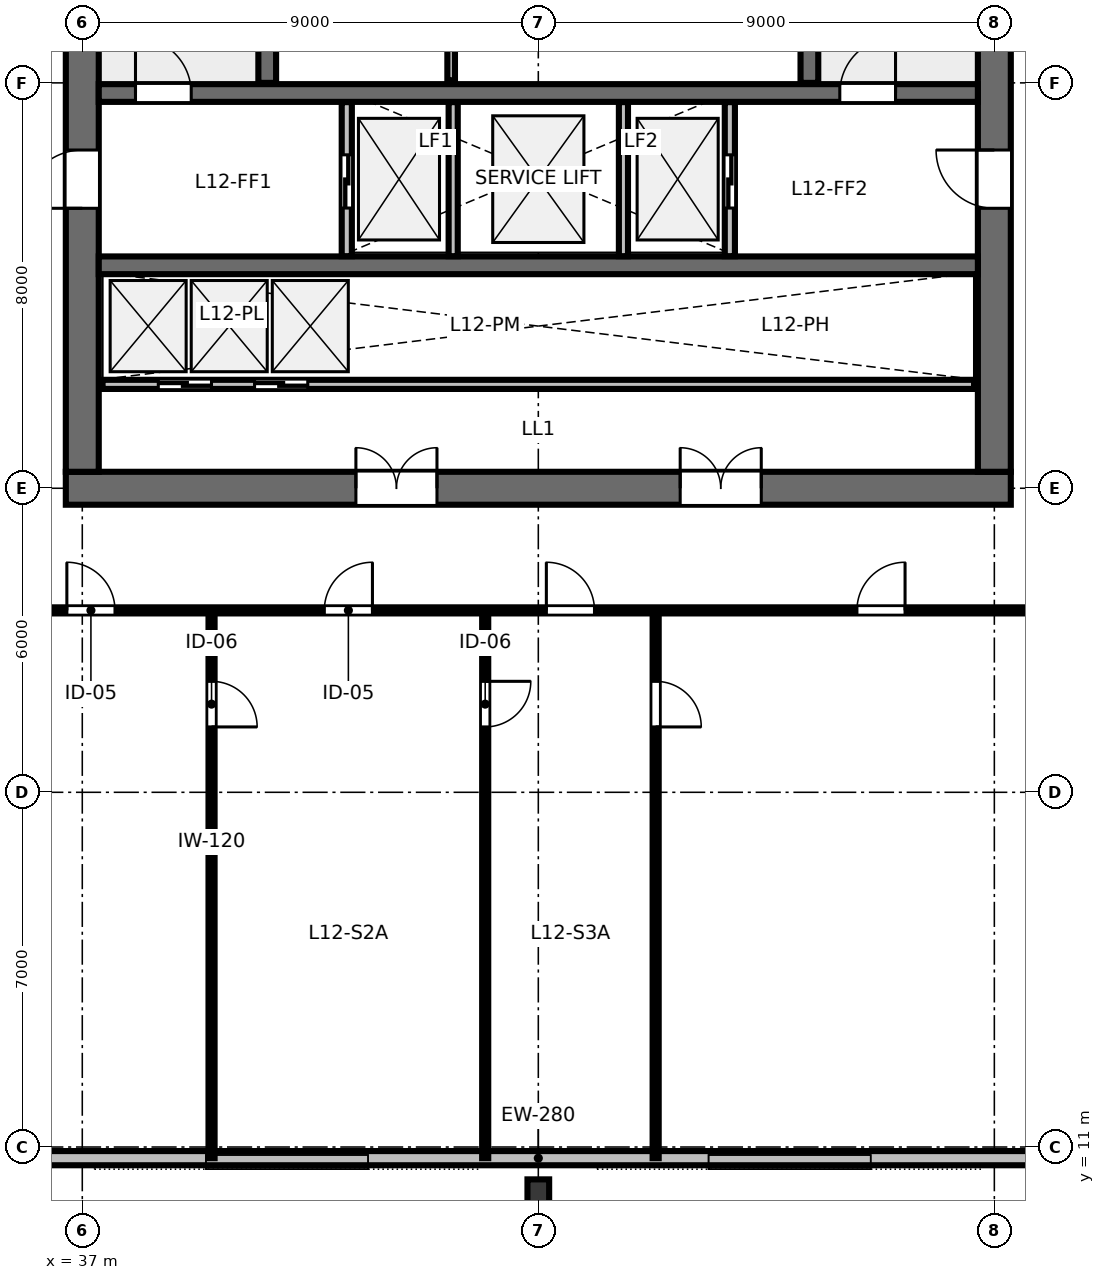
"""IFC4 building model, lengths in metres.
Left out: names, types, materials, properties, quantities, classifications, styles, units other than length and angle.
Written with IfcOpenShell. Run it as: python <this file> out.ifc"""

import sys

from ifc_helpers import new_model, si_unit, direction, frame, frame_2d, origin, origin_2d, place, context, subcontext, project, spatial, rectangle, i_section, extrude, element, fill, save


model = new_model("IFC4")
c1 = context("Model", 3, precision=1e-05, world=origin(), true_north=direction((0.0, 1.0)))
c2 = subcontext(c1, "Body", "Model", "MODEL_VIEW")
j1 = project(units=[si_unit("LENGTHUNIT", "METRE"), si_unit("PLANEANGLEUNIT", "RADIAN")], contexts=[c1])
p1 = place(None, origin())
s1 = spatial("IfcSite", under=j1, at=p1, CompositionType="ELEMENT")
p2 = place(p1, origin())
s2 = spatial("IfcBuilding", under=s1, at=p2, CompositionType="ELEMENT")
p3 = place(p2, frame((0.0, 0.0, 49.6)))
s3 = spatial("IfcBuildingStorey", under=s2, at=p3, CompositionType="ELEMENT", Elevation=49.6)
p4 = place(p3, frame((36.675, 24.0, 0.0), z_axis=(0.0, 0.0, 1.0), x_axis=(1.0, 0.0, 0.0)))
e1 = element("IfcWall", 1, at=p4, inside=s3, PredefinedType="SHEAR", context=c2, shape_type="SweptSolid", body=[
    extrude(rectangle(XDim=18.65, YDim=0.65, at=frame_2d((9.325, 0.0))), origin(), (0.0, 0.0, 1.0), 3.36),
])
p5 = place(p4, frame((5.725, 0.0, 0.0)))
e2 = element("IfcOpeningElement", 2, at=p5, cuts=e1, PredefinedType="OPENING", context=c2, shape_type="SweptSolid", body=[
    extrude(rectangle(XDim=1.6, YDim=2.15, at=frame_2d((0.8, 1.075))), frame((0.0, 0.335, 0.0), z_axis=(0.0, -1.0, 0.0), x_axis=(1.0, 0.0, 0.0)), (0.0, 0.0, 1.0), 0.67),
])
p6 = place(p4, frame((12.125, 0.0, 0.0)))
e3 = element("IfcOpeningElement", 3, at=p6, cuts=e1, PredefinedType="OPENING", context=c2, shape_type="SweptSolid", body=[
    extrude(rectangle(XDim=1.6, YDim=2.15, at=frame_2d((0.8, 1.075))), frame((0.0, 0.335, 0.0), z_axis=(0.0, -1.0, 0.0), x_axis=(1.0, 0.0, 0.0)), (0.0, 0.0, 1.0), 0.67),
])
p7 = place(p3, frame((37.0, 24.325, 0.0), z_axis=(0.0, 0.0, 1.0), x_axis=(0.0, 1.0, 0.0)))
e4 = element("IfcWall", 4, at=p7, inside=s3, PredefinedType="SHEAR", context=c2, shape_type="SweptSolid", body=[
    extrude(rectangle(XDim=15.35, YDim=0.65, at=frame_2d((7.675, 0.0))), origin(), (0.0, 0.0, 1.0), 3.36),
])
p8 = place(p7, frame((5.2, 0.0, 0.0)))
e5 = element("IfcOpeningElement", 5, at=p8, cuts=e4, PredefinedType="OPENING", context=c2, shape_type="SweptSolid", body=[
    extrude(rectangle(XDim=1.15, YDim=2.15, at=frame_2d((0.575, 1.075))), frame((0.0, 0.335, 0.0), z_axis=(0.0, -1.0, 0.0), x_axis=(1.0, 0.0, 0.0)), (0.0, 0.0, 1.0), 0.67),
])
p9 = place(p3, frame((55.0, 24.325, 0.0), z_axis=(0.0, 0.0, 1.0), x_axis=(0.0, 1.0, 0.0)))
e6 = element("IfcWall", 6, at=p9, inside=s3, PredefinedType="SHEAR", context=c2, shape_type="SweptSolid", body=[
    extrude(rectangle(XDim=15.35, YDim=0.65, at=frame_2d((7.675, 0.0))), origin(), (0.0, 0.0, 1.0), 3.36),
])
p10 = place(p9, frame((5.2, 0.0, 0.0)))
e7 = element("IfcOpeningElement", 7, at=p10, cuts=e6, PredefinedType="OPENING", context=c2, shape_type="SweptSolid", body=[
    extrude(rectangle(XDim=1.15, YDim=2.15, at=frame_2d((0.575, 1.075))), frame((0.0, 0.335, 0.0), z_axis=(0.0, -1.0, 0.0), x_axis=(1.0, 0.0, 0.0)), (0.0, 0.0, 1.0), 0.67),
])
p11 = place(p3, frame((37.325, 31.8, 0.0), z_axis=(0.0, 0.0, 1.0), x_axis=(1.0, 0.0, 0.0)))
e8 = element("IfcWall", 8, at=p11, inside=s3, PredefinedType="SHEAR", context=c2, shape_type="SweptSolid", body=[
    extrude(rectangle(XDim=17.35, YDim=0.35, at=frame_2d((8.675, 0.0))), origin(), (0.0, 0.0, 1.0), 3.36),
])
p12 = place(p11, frame((0.725, 0.0, 0.0)))
e9 = element("IfcOpeningElement", 9, at=p12, cuts=e8, PredefinedType="OPENING", context=c2, shape_type="SweptSolid", body=[
    extrude(rectangle(XDim=1.1, YDim=2.15, at=frame_2d((0.55, 1.075))), frame((0.0, 0.185, 0.0), z_axis=(0.0, -1.0, 0.0), x_axis=(1.0, 0.0, 0.0)), (0.0, 0.0, 1.0), 0.37),
])
p13 = place(p11, frame((14.625, 0.0, 0.0)))
e10 = element("IfcOpeningElement", 10, at=p13, cuts=e8, PredefinedType="OPENING", context=c2, shape_type="SweptSolid", body=[
    extrude(rectangle(XDim=1.1, YDim=2.15, at=frame_2d((0.55, 1.075))), frame((0.0, 0.185, 0.0), z_axis=(0.0, -1.0, 0.0), x_axis=(1.0, 0.0, 0.0)), (0.0, 0.0, 1.0), 0.37),
])
p14 = place(p3, frame((37.325, 28.4, 0.0), z_axis=(0.0, 0.0, 1.0), x_axis=(1.0, 0.0, 0.0)))
e11 = element("IfcWall", 11, at=p14, inside=s3, PredefinedType="SHEAR", context=c2, shape_type="SweptSolid", body=[
    extrude(rectangle(XDim=17.35, YDim=0.35, at=frame_2d((8.675, 0.0))), origin(), (0.0, 0.0, 1.0), 3.36),
])
p15 = place(p3, frame((46.0, 10.12, 0.0), z_axis=(0.0, 0.0, 1.0), x_axis=(1.0, 0.0, 0.0)))
e12 = element("IfcColumn", 12, at=p15, inside=s3, PredefinedType="COLUMN", context=c2, shape_type="SweptSolid", body=[
    extrude(i_section(OverallWidth=0.428, OverallDepth=0.483, WebThickness=0.051, FlangeThickness=0.082, FilletRadius=0.025, at=origin_2d()), origin(), (0.0, 0.0, 1.0), 3.358),
])
p16 = place(p3, frame((25.26, 10.78, 0.0), z_axis=(0.0, 0.0, 1.0), x_axis=(1.0, 0.0, 0.0)))
e13 = element("IfcWall", 13, at=p16, inside=s3, PredefinedType="STANDARD", context=c2, shape_type="SweptSolid", body=[
    extrude(rectangle(XDim=41.48, YDim=0.28, at=frame_2d((20.74, 0.0))), origin(), (0.0, 0.0, 1.0), 3.36),
])
for number, where, z_axis, x_axis in (
    (14, (40.65, 32.0, 0.0), (0.0, 0.0, 1.0), (0.0, 1.0, 0.0)),
    (15, (51.35, 32.0, 0.0), (0.0, 0.0, 1.0), (0.0, 1.0, 0.0)),
):
    element("IfcWall", number, at=place(p3, frame(where, z_axis=z_axis, x_axis=x_axis)), inside=s3, PredefinedType="SHEAR", context=c2, shape_type="SweptSolid", body=[
        extrude(rectangle(XDim=7.7, YDim=0.35, at=frame_2d((3.85, 0.0))), origin(), (0.0, 0.0, 1.0), 3.6),
    ])
p17 = place(p3, frame((44.28, 32.05, 0.0), z_axis=(0.0, 0.0, 1.0), x_axis=(0.0, 1.0, 0.0)))
e16 = element("IfcWall", 16, at=p17, inside=s3, PredefinedType="PARTITIONING", context=c2, shape_type="SweptSolid", body=[
    extrude(rectangle(XDim=3.67, YDim=0.15, at=frame_2d((1.835, 0.0))), origin(), (0.0, 0.0, 1.0), 3.36),
])
p18 = place(p17, frame((1.35, 0.0, 0.0)))
e17 = element("IfcOpeningElement", 17, at=p18, cuts=e16, PredefinedType="OPENING", context=c2, shape_type="SweptSolid", body=[
    extrude(rectangle(XDim=0.92, YDim=2.15, at=frame_2d((0.46, 1.075))), frame((0.0, 0.085, 0.0), z_axis=(0.0, -1.0, 0.0), x_axis=(1.0, 0.0, 0.0)), (0.0, 0.0, 1.0), 0.17),
])
p19 = place(p3, frame((42.22, 28.58, 0.0), z_axis=(0.0, 0.0, 1.0), x_axis=(0.0, 1.0, 0.0)))
e18 = element("IfcWall", 18, at=p19, inside=s3, PredefinedType="PARTITIONING", context=c2, shape_type="SweptSolid", body=[
    extrude(rectangle(XDim=3.04, YDim=0.2, at=frame_2d((1.52, 0.0))), origin(), (0.0, 0.0, 1.0), 3.36),
])
p20 = place(p19, frame((0.95, 0.0, 0.0)))
e19 = element("IfcOpeningElement", 19, at=p20, cuts=e18, PredefinedType="OPENING", context=c2, shape_type="SweptSolid", body=[
    extrude(rectangle(XDim=1.05, YDim=2.15, at=frame_2d((0.525, 1.075))), frame((0.0, 0.11, 0.0), z_axis=(0.0, -1.0, 0.0), x_axis=(1.0, 0.0, 0.0)), (0.0, 0.0, 1.0), 0.22),
])
p21 = place(p3, frame((49.78, 28.58, 0.0), z_axis=(0.0, 0.0, 1.0), x_axis=(0.0, 1.0, 0.0)))
e20 = element("IfcWall", 20, at=p21, inside=s3, PredefinedType="PARTITIONING", context=c2, shape_type="SweptSolid", body=[
    extrude(rectangle(XDim=3.04, YDim=0.2, at=frame_2d((1.52, 0.0))), origin(), (0.0, 0.0, 1.0), 3.36),
])
p22 = place(p21, frame((0.95, 0.0, 0.0)))
e21 = element("IfcOpeningElement", 21, at=p22, cuts=e20, PredefinedType="OPENING", context=c2, shape_type="SweptSolid", body=[
    extrude(rectangle(XDim=1.05, YDim=2.15, at=frame_2d((0.525, 1.075))), frame((0.0, 0.11, 0.0), z_axis=(0.0, -1.0, 0.0), x_axis=(1.0, 0.0, 0.0)), (0.0, 0.0, 1.0), 0.22),
])
for number, where, z_axis, x_axis in (
    (22, (44.32, 28.58, 0.0), (0.0, 0.0, 1.0), (0.0, 1.0, 0.0)),
    (23, (47.68, 28.58, 0.0), (0.0, 0.0, 1.0), (0.0, 1.0, 0.0)),
):
    element("IfcWall", number, at=place(p3, frame(where, z_axis=z_axis, x_axis=x_axis)), inside=s3, PredefinedType="PARTITIONING", context=c2, shape_type="SweptSolid", body=[
        extrude(rectangle(XDim=3.04, YDim=0.18, at=frame_2d((1.52, 0.0))), origin(), (0.0, 0.0, 1.0), 3.36),
    ])
p23 = place(p3, frame((37.4, 26.05, 0.0), z_axis=(0.0, 0.0, 1.0), x_axis=(1.0, 0.0, 0.0)))
e24 = element("IfcWall", 24, at=p23, inside=s3, PredefinedType="PARTITIONING", context=c2, shape_type="SweptSolid", body=[
    extrude(rectangle(XDim=17.2, YDim=0.18, at=frame_2d((8.6, 0.0))), origin(), (0.0, 0.0, 1.0), 3.36),
])
p24 = place(p23, frame((1.1, 0.0, 0.0)))
e25 = element("IfcOpeningElement", 25, at=p24, cuts=e24, PredefinedType="OPENING", context=c2, shape_type="SweptSolid", body=[
    extrude(rectangle(XDim=1.05, YDim=2.15, at=frame_2d((0.525, 1.075))), frame((0.0, 0.1, 0.0), z_axis=(0.0, -1.0, 0.0), x_axis=(1.0, 0.0, 0.0)), (0.0, 0.0, 1.0), 0.2),
])
p25 = place(p23, frame((3.0, 0.0, 0.0)))
e26 = element("IfcOpeningElement", 26, at=p25, cuts=e24, PredefinedType="OPENING", context=c2, shape_type="SweptSolid", body=[
    extrude(rectangle(XDim=1.05, YDim=2.15, at=frame_2d((0.525, 1.075))), frame((0.0, 0.1, 0.0), z_axis=(0.0, -1.0, 0.0), x_axis=(1.0, 0.0, 0.0)), (0.0, 0.0, 1.0), 0.2),
])
p26 = place(p3, frame((39.551, 21.59, 0.0), z_axis=(0.0, 0.0, 1.0), x_axis=(0.0, -1.0, 0.0)))
e27 = element("IfcWall", 27, at=p26, inside=s3, PredefinedType="PARTITIONING", context=c2, shape_type="SweptSolid", body=[
    extrude(rectangle(XDim=10.81, YDim=0.12, at=frame_2d((5.405, 0.0))), origin(), (0.0, 0.0, 1.0), 2.64),
])
p27 = place(p26, frame((1.4, 0.0, 0.0)))
e28 = element("IfcOpeningElement", 28, at=p27, cuts=e27, PredefinedType="OPENING", context=c2, shape_type="SweptSolid", body=[
    extrude(rectangle(XDim=0.9, YDim=2.15, at=frame_2d((0.45, 1.075))), frame((0.0, 0.07, 0.0), z_axis=(0.0, -1.0, 0.0), x_axis=(1.0, 0.0, 0.0)), (0.0, 0.0, 1.0), 0.14),
])
p28 = place(p3, frame((44.952, 21.59, 0.0), z_axis=(0.0, 0.0, 1.0), x_axis=(0.0, -1.0, 0.0)))
e29 = element("IfcWall", 29, at=p28, inside=s3, PredefinedType="PARTITIONING", context=c2, shape_type="SweptSolid", body=[
    extrude(rectangle(XDim=10.81, YDim=0.12, at=frame_2d((5.405, 0.0))), origin(), (0.0, 0.0, 1.0), 2.64),
])
p29 = place(p28, frame((1.4, 0.0, 0.0)))
e30 = element("IfcOpeningElement", 30, at=p29, cuts=e29, PredefinedType="OPENING", context=c2, shape_type="SweptSolid", body=[
    extrude(rectangle(XDim=0.9, YDim=2.15, at=frame_2d((0.45, 1.075))), frame((0.0, 0.07, 0.0), z_axis=(0.0, -1.0, 0.0), x_axis=(1.0, 0.0, 0.0)), (0.0, 0.0, 1.0), 0.14),
])
p30 = place(p3, frame((48.316, 21.59, 0.0), z_axis=(0.0, 0.0, 1.0), x_axis=(0.0, -1.0, 0.0)))
e31 = element("IfcWall", 31, at=p30, inside=s3, PredefinedType="PARTITIONING", context=c2, shape_type="SweptSolid", body=[
    extrude(rectangle(XDim=10.81, YDim=0.12, at=frame_2d((5.405, 0.0))), origin(), (0.0, 0.0, 1.0), 2.64),
])
p31 = place(p30, frame((1.4, 0.0, 0.0)))
e32 = element("IfcOpeningElement", 32, at=p31, cuts=e31, PredefinedType="OPENING", context=c2, shape_type="SweptSolid", body=[
    extrude(rectangle(XDim=0.9, YDim=2.15, at=frame_2d((0.45, 1.075))), frame((0.0, 0.07, 0.0), z_axis=(0.0, -1.0, 0.0), x_axis=(1.0, 0.0, 0.0)), (0.0, 0.0, 1.0), 0.14),
])
p32 = place(p3, frame((34.65, 21.59, 0.0), z_axis=(0.0, 0.0, 1.0), x_axis=(1.0, 0.0, 0.0)))
e33 = element("IfcWall", 33, at=p32, inside=s3, PredefinedType="PARTITIONING", context=c2, shape_type="SweptSolid", body=[
    extrude(rectangle(XDim=22.7, YDim=0.12, at=frame_2d((11.35, 0.0))), origin(), (0.0, 0.0, 1.0), 2.64),
])
p33 = place(p32, frame((2.045, 0.0, 0.0)))
e34 = element("IfcOpeningElement", 34, at=p33, cuts=e33, PredefinedType="OPENING", context=c2, shape_type="SweptSolid", body=[
    extrude(rectangle(XDim=0.95, YDim=2.15, at=frame_2d((0.475, 1.075))), frame((0.0, 0.07, 0.0), z_axis=(0.0, -1.0, 0.0), x_axis=(1.0, 0.0, 0.0)), (0.0, 0.0, 1.0), 0.14),
])
p34 = place(p32, frame((7.126, 0.0, 0.0)))
e35 = element("IfcOpeningElement", 35, at=p34, cuts=e33, PredefinedType="OPENING", context=c2, shape_type="SweptSolid", body=[
    extrude(rectangle(XDim=0.95, YDim=2.15, at=frame_2d((0.475, 1.075))), frame((0.0, 0.07, 0.0), z_axis=(0.0, -1.0, 0.0), x_axis=(1.0, 0.0, 0.0)), (0.0, 0.0, 1.0), 0.14),
])
p35 = place(p32, frame((11.509, 0.0, 0.0)))
e36 = element("IfcOpeningElement", 36, at=p35, cuts=e33, PredefinedType="OPENING", context=c2, shape_type="SweptSolid", body=[
    extrude(rectangle(XDim=0.95, YDim=2.15, at=frame_2d((0.475, 1.075))), frame((0.0, 0.07, 0.0), z_axis=(0.0, -1.0, 0.0), x_axis=(1.0, 0.0, 0.0)), (0.0, 0.0, 1.0), 0.14),
])
p36 = place(p32, frame((17.638, 0.0, 0.0)))
e37 = element("IfcOpeningElement", 37, at=p36, cuts=e33, PredefinedType="OPENING", context=c2, shape_type="SweptSolid", body=[
    extrude(rectangle(XDim=0.95, YDim=2.15, at=frame_2d((0.475, 1.075))), frame((0.0, 0.07, 0.0), z_axis=(0.0, -1.0, 0.0), x_axis=(1.0, 0.0, 0.0)), (0.0, 0.0, 1.0), 0.14),
])
p37 = place(p12, origin())
e38 = element("IfcDoor", 38, at=p37, inside=s3, OperationType="SINGLE_SWING_LEFT", PredefinedType="DOOR", context=c2, shape_type="SweptSolid", body=[
    extrude(rectangle(XDim=1.1, YDim=2.15, at=frame_2d((0.55, 1.075))), frame((0.0, 0.025, 0.0), z_axis=(0.0, -1.0, 0.0), x_axis=(1.0, 0.0, 0.0)), (0.0, 0.0, 1.0), 0.05),
])
fill(e9, e38)
p38 = place(p13, origin())
e39 = element("IfcDoor", 39, at=p38, inside=s3, OperationType="SINGLE_SWING_RIGHT", PredefinedType="DOOR", context=c2, shape_type="SweptSolid", body=[
    extrude(rectangle(XDim=1.1, YDim=2.15, at=frame_2d((0.55, 1.075))), frame((0.0, 0.025, 0.0), z_axis=(0.0, -1.0, 0.0), x_axis=(1.0, 0.0, 0.0)), (0.0, 0.0, 1.0), 0.05),
])
fill(e10, e39)
p39 = place(p8, origin())
e40 = element("IfcDoor", 40, at=p39, inside=s3, OperationType="SINGLE_SWING_LEFT", PredefinedType="DOOR", context=c2, shape_type="SweptSolid", body=[
    extrude(rectangle(XDim=1.15, YDim=2.15, at=frame_2d((0.575, 1.075))), frame((0.0, 0.025, 0.0), z_axis=(0.0, -1.0, 0.0), x_axis=(1.0, 0.0, 0.0)), (0.0, 0.0, 1.0), 0.05),
])
fill(e5, e40)
p40 = place(p10, origin())
e41 = element("IfcDoor", 41, at=p40, inside=s3, OperationType="SINGLE_SWING_RIGHT", PredefinedType="DOOR", context=c2, shape_type="SweptSolid", body=[
    extrude(rectangle(XDim=1.15, YDim=2.15, at=frame_2d((0.575, 1.075))), frame((0.0, 0.025, 0.0), z_axis=(0.0, -1.0, 0.0), x_axis=(1.0, 0.0, 0.0)), (0.0, 0.0, 1.0), 0.05),
])
fill(e7, e41)
p41 = place(p5, origin())
e42 = element("IfcDoor", 42, at=p41, inside=s3, OperationType="DOUBLE_DOOR_SINGLE_SWING", PredefinedType="DOOR", context=c2, shape_type="SweptSolid", body=[
    extrude(rectangle(XDim=1.6, YDim=2.15, at=frame_2d((0.8, 1.075))), frame((0.0, 0.025, 0.0), z_axis=(0.0, -1.0, 0.0), x_axis=(1.0, 0.0, 0.0)), (0.0, 0.0, 1.0), 0.05),
])
fill(e2, e42)
p42 = place(p6, origin())
e43 = element("IfcDoor", 43, at=p42, inside=s3, OperationType="DOUBLE_DOOR_SINGLE_SWING", PredefinedType="DOOR", context=c2, shape_type="SweptSolid", body=[
    extrude(rectangle(XDim=1.6, YDim=2.15, at=frame_2d((0.8, 1.075))), frame((0.0, 0.025, 0.0), z_axis=(0.0, -1.0, 0.0), x_axis=(1.0, 0.0, 0.0)), (0.0, 0.0, 1.0), 0.05),
])
fill(e3, e43)
p43 = place(p20, origin())
e44 = element("IfcDoor", 44, at=p43, inside=s3, OperationType="SLIDING_TO_LEFT", PredefinedType="DOOR", context=c2, shape_type="SweptSolid", body=[
    extrude(rectangle(XDim=1.05, YDim=2.15, at=frame_2d((0.525, 1.075))), frame((0.0, 0.025, 0.0), z_axis=(0.0, -1.0, 0.0), x_axis=(1.0, 0.0, 0.0)), (0.0, 0.0, 1.0), 0.05),
])
fill(e19, e44)
p44 = place(p22, origin())
e45 = element("IfcDoor", 45, at=p44, inside=s3, OperationType="SLIDING_TO_RIGHT", PredefinedType="DOOR", context=c2, shape_type="SweptSolid", body=[
    extrude(rectangle(XDim=1.05, YDim=2.15, at=frame_2d((0.525, 1.075))), frame((0.0, 0.025, 0.0), z_axis=(0.0, -1.0, 0.0), x_axis=(1.0, 0.0, 0.0)), (0.0, 0.0, 1.0), 0.05),
])
fill(e21, e45)
p45 = place(p24, origin())
e46 = element("IfcDoor", 46, at=p45, inside=s3, OperationType="SLIDING_TO_LEFT", PredefinedType="DOOR", context=c2, shape_type="SweptSolid", body=[
    extrude(rectangle(XDim=1.05, YDim=2.15, at=frame_2d((0.525, 1.075))), frame((0.0, 0.025, 0.0), z_axis=(0.0, -1.0, 0.0), x_axis=(1.0, 0.0, 0.0)), (0.0, 0.0, 1.0), 0.05),
])
fill(e25, e46)
p46 = place(p25, origin())
e47 = element("IfcDoor", 47, at=p46, inside=s3, OperationType="SLIDING_TO_RIGHT", PredefinedType="DOOR", context=c2, shape_type="SweptSolid", body=[
    extrude(rectangle(XDim=1.05, YDim=2.15, at=frame_2d((0.525, 1.075))), frame((0.0, 0.025, 0.0), z_axis=(0.0, -1.0, 0.0), x_axis=(1.0, 0.0, 0.0)), (0.0, 0.0, 1.0), 0.05),
])
fill(e26, e47)
p47 = place(p27, origin())
e48 = element("IfcDoor", 48, at=p47, inside=s3, OperationType="SINGLE_SWING_RIGHT", PredefinedType="DOOR", context=c2, shape_type="SweptSolid", body=[
    extrude(rectangle(XDim=0.9, YDim=2.15, at=frame_2d((0.45, 1.075))), frame((0.0, 0.025, 0.0), z_axis=(0.0, -1.0, 0.0), x_axis=(1.0, 0.0, 0.0)), (0.0, 0.0, 1.0), 0.05),
])
fill(e28, e48)
p48 = place(p29, origin())
e49 = element("IfcDoor", 49, at=p48, inside=s3, OperationType="SINGLE_SWING_LEFT", PredefinedType="DOOR", context=c2, shape_type="SweptSolid", body=[
    extrude(rectangle(XDim=0.9, YDim=2.15, at=frame_2d((0.45, 1.075))), frame((0.0, 0.025, 0.0), z_axis=(0.0, -1.0, 0.0), x_axis=(1.0, 0.0, 0.0)), (0.0, 0.0, 1.0), 0.05),
])
fill(e30, e49)
p49 = place(p31, origin())
e50 = element("IfcDoor", 50, at=p49, inside=s3, OperationType="SINGLE_SWING_RIGHT", PredefinedType="DOOR", context=c2, shape_type="SweptSolid", body=[
    extrude(rectangle(XDim=0.9, YDim=2.15, at=frame_2d((0.45, 1.075))), frame((0.0, 0.025, 0.0), z_axis=(0.0, -1.0, 0.0), x_axis=(1.0, 0.0, 0.0)), (0.0, 0.0, 1.0), 0.05),
])
fill(e32, e50)
p50 = place(p33, origin())
e51 = element("IfcDoor", 51, at=p50, inside=s3, OperationType="SINGLE_SWING_LEFT", PredefinedType="DOOR", context=c2, shape_type="SweptSolid", body=[
    extrude(rectangle(XDim=0.95, YDim=2.15, at=frame_2d((0.475, 1.075))), frame((0.0, 0.025, 0.0), z_axis=(0.0, -1.0, 0.0), x_axis=(1.0, 0.0, 0.0)), (0.0, 0.0, 1.0), 0.05),
])
fill(e34, e51)
p51 = place(p34, origin())
e52 = element("IfcDoor", 52, at=p51, inside=s3, OperationType="SINGLE_SWING_RIGHT", PredefinedType="DOOR", context=c2, shape_type="SweptSolid", body=[
    extrude(rectangle(XDim=0.95, YDim=2.15, at=frame_2d((0.475, 1.075))), frame((0.0, 0.025, 0.0), z_axis=(0.0, -1.0, 0.0), x_axis=(1.0, 0.0, 0.0)), (0.0, 0.0, 1.0), 0.05),
])
fill(e35, e52)
p52 = place(p35, origin())
e53 = element("IfcDoor", 53, at=p52, inside=s3, OperationType="SINGLE_SWING_LEFT", PredefinedType="DOOR", context=c2, shape_type="SweptSolid", body=[
    extrude(rectangle(XDim=0.95, YDim=2.15, at=frame_2d((0.475, 1.075))), frame((0.0, 0.025, 0.0), z_axis=(0.0, -1.0, 0.0), x_axis=(1.0, 0.0, 0.0)), (0.0, 0.0, 1.0), 0.05),
])
fill(e36, e53)
p53 = place(p36, origin())
e54 = element("IfcDoor", 54, at=p53, inside=s3, OperationType="SINGLE_SWING_RIGHT", PredefinedType="DOOR", context=c2, shape_type="SweptSolid", body=[
    extrude(rectangle(XDim=0.95, YDim=2.15, at=frame_2d((0.475, 1.075))), frame((0.0, 0.025, 0.0), z_axis=(0.0, -1.0, 0.0), x_axis=(1.0, 0.0, 0.0)), (0.0, 0.0, 1.0), 0.05),
])
fill(e37, e54)
save(model, sys.argv[1])
